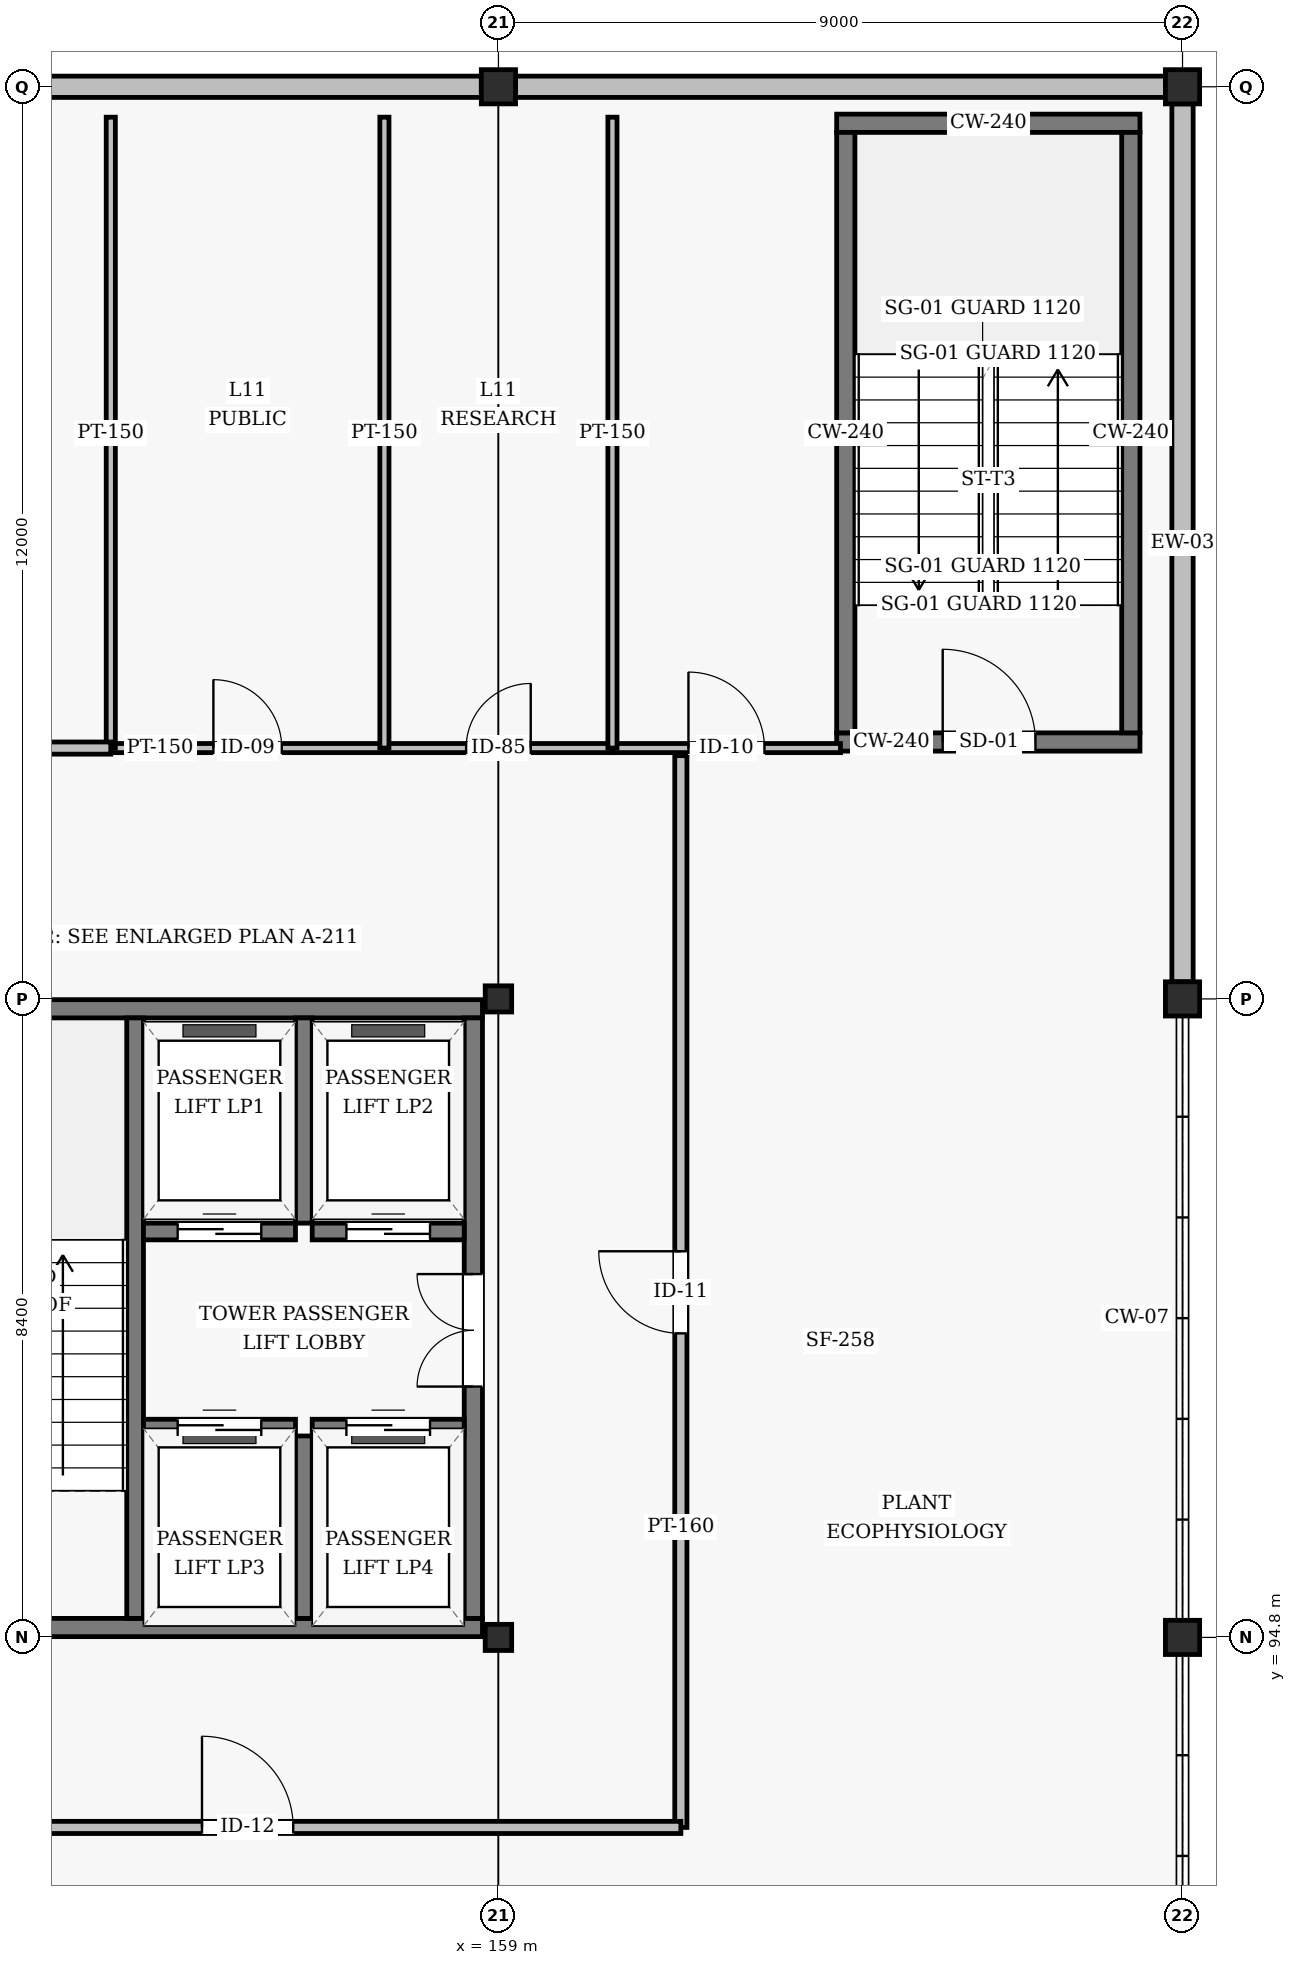
"""IFC4 building model, lengths in metres.
Left out: names, types, materials, properties, quantities, classifications, styles, units other than length and angle.
Written with IfcOpenShell. Run it as: python <this file> out.ifc"""

import sys

from ifc_helpers import new_model, si_unit, direction, frame, frame_2d, origin, origin_2d, place, context, subcontext, project, spatial, rectangle, hollow_rectangle, i_section, extrude, element, fill, save


model = new_model("IFC4")
c1 = context("Model", 3, precision=1e-05, world=origin(), true_north=direction((0.0, 1.0)))
c2 = subcontext(c1, "Body", "Model", "MODEL_VIEW")
j1 = project(units=[si_unit("LENGTHUNIT", "METRE"), si_unit("PLANEANGLEUNIT", "RADIAN")], contexts=[c1])
p1 = place(None, origin())
s1 = spatial("IfcSite", under=j1, at=p1, CompositionType="ELEMENT")
p2 = place(p1, origin())
s2 = spatial("IfcBuilding", under=s1, at=p2, CompositionType="ELEMENT")
p3 = place(p2, frame((0.0, 0.0, 43.2)))
s3 = spatial("IfcBuildingStorey", under=s2, at=p3, CompositionType="ELEMENT", Elevation=43.2)
for number, where, z_axis, x_axis in (
    (1, (159.0, 94.8, 0.0), (0.0, 0.0, 1.0), (1.0, 0.0, 0.0)),
    (2, (159.0, 103.2, 0.0), (0.0, 0.0, 1.0), (1.0, 0.0, 0.0)),
):
    element("IfcColumn", number, at=place(p3, frame(where, z_axis=z_axis, x_axis=x_axis)), inside=s3, PredefinedType="COLUMN", context=c2, shape_type="SweptSolid", body=[
        extrude(i_section(OverallWidth=0.348, OverallDepth=0.344, WebThickness=0.01, FlangeThickness=0.016, FilletRadius=0.02, at=origin_2d()), origin(), (0.0, 0.0, 1.0), 3.6),
    ])
for number, where, z_axis, x_axis in (
    (3, (159.0, 115.2, 0.0), (0.0, 0.0, 1.0), (1.0, 0.0, 0.0)),
    (4, (168.0, 94.8, 0.0), (0.0, 0.0, 1.0), (1.0, 0.0, 0.0)),
    (5, (168.0, 103.2, 0.0), (0.0, 0.0, 1.0), (1.0, 0.0, 0.0)),
    (6, (168.0, 115.2, 0.0), (0.0, 0.0, 1.0), (1.0, 0.0, 0.0)),
):
    element("IfcColumn", number, at=place(p3, frame(where, z_axis=z_axis, x_axis=x_axis)), inside=s3, PredefinedType="COLUMN", context=c2, shape_type="SweptSolid", body=[
        extrude(hollow_rectangle(XDim=0.45, YDim=0.45, WallThickness=0.018, InnerFilletRadius=0.018, OuterFilletRadius=0.036, at=origin_2d()), origin(), (0.0, 0.0, 1.0), 3.6),
    ])
p4 = place(p3, frame((168.0, 103.425, 0.0), z_axis=(0.0, 0.0, 1.0), x_axis=(0.0, 1.0, 0.0)))
e7 = element("IfcWall", 7, at=p4, inside=s3, PredefinedType="SOLIDWALL", context=c2, shape_type="SweptSolid", body=[
    extrude(rectangle(XDim=11.55, YDim=0.28, at=frame_2d((5.775, 0.0))), origin(), (0.0, 0.0, 1.0), 2.562),
])
for number, where, z_axis, x_axis in (
    (8, (167.775, 115.2, 0.0), (0.0, 0.0, 1.0), (-1.0, 0.0, 0.0)),
    (9, (158.775, 115.2, 0.0), (0.0, 0.0, 1.0), (-1.0, 0.0, 0.0)),
):
    element("IfcWall", number, at=place(p3, frame(where, z_axis=z_axis, x_axis=x_axis)), inside=s3, PredefinedType="SOLIDWALL", context=c2, shape_type="SweptSolid", body=[
        extrude(rectangle(XDim=8.55, YDim=0.28, at=frame_2d((4.275, 0.0))), origin(), (0.0, 0.0, 1.0), 2.562),
    ])
p5 = place(p3, frame((150.02, 94.93, 0.0), z_axis=(0.0, 0.0, 1.0), x_axis=(1.0, 0.0, 0.0)))
e10 = element("IfcWall", 10, at=p5, inside=s3, PredefinedType="SHEAR", context=c2, shape_type="SweptSolid", body=[
    extrude(rectangle(XDim=8.77, YDim=0.24, at=frame_2d((4.385, 0.0))), origin(), (0.0, 0.0, 1.0), 3.354),
])
p6 = place(p5, frame((1.79, 0.0, 0.0)))
e11 = element("IfcOpeningElement", 11, at=p6, cuts=e10, PredefinedType="OPENING", context=c2, shape_type="SweptSolid", body=[
    extrude(rectangle(XDim=1.22, YDim=2.18, at=frame_2d((0.61, 1.09))), frame((0.0, 0.13, 0.0), z_axis=(0.0, -1.0, 0.0), x_axis=(1.0, 0.0, 0.0)), (0.0, 0.0, 1.0), 0.26),
])
p7 = place(p3, frame((150.02, 103.07, 0.0), z_axis=(0.0, 0.0, 1.0), x_axis=(1.0, 0.0, 0.0)))
e12 = element("IfcWall", 12, at=p7, inside=s3, PredefinedType="SHEAR", context=c2, shape_type="SweptSolid", body=[
    extrude(rectangle(XDim=8.77, YDim=0.24, at=frame_2d((4.385, 0.0))), origin(), (0.0, 0.0, 1.0), 3.354),
])
p8 = place(p3, frame((154.22, 95.05, 0.0), z_axis=(0.0, 0.0, 1.0), x_axis=(0.0, 1.0, 0.0)))
e13 = element("IfcWall", 13, at=p8, inside=s3, PredefinedType="SHEAR", context=c2, shape_type="SweptSolid", body=[
    extrude(rectangle(XDim=7.9, YDim=0.22, at=frame_2d((3.95, 0.0))), origin(), (0.0, 0.0, 1.0), 3.354),
])
p9 = place(p3, frame((158.67, 95.05, 0.0), z_axis=(0.0, 0.0, 1.0), x_axis=(0.0, 1.0, 0.0)))
e14 = element("IfcWall", 14, at=p9, inside=s3, PredefinedType="SHEAR", context=c2, shape_type="SweptSolid", body=[
    extrude(rectangle(XDim=7.9, YDim=0.24, at=frame_2d((3.95, 0.0))), origin(), (0.0, 0.0, 1.0), 3.354),
])
p10 = place(p9, frame((3.05, 0.0, 0.0)))
e15 = element("IfcOpeningElement", 15, at=p10, cuts=e14, PredefinedType="OPENING", context=c2, shape_type="SweptSolid", body=[
    extrude(rectangle(XDim=1.48, YDim=2.22, at=frame_2d((0.74, 1.11))), frame((0.0, 0.13, 0.0), z_axis=(0.0, -1.0, 0.0), x_axis=(1.0, 0.0, 0.0)), (0.0, 0.0, 1.0), 0.26),
])
p11 = place(p3, frame((156.44, 100.25, 0.0), z_axis=(0.0, 0.0, 1.0), x_axis=(0.0, 1.0, 0.0)))
e16 = element("IfcWall", 16, at=p11, inside=s3, PredefinedType="SHEAR", context=c2, shape_type="SweptSolid", body=[
    extrude(rectangle(XDim=2.7, YDim=0.22, at=frame_2d((1.35, 0.0))), origin(), (0.0, 0.0, 1.0), 3.354),
])
p12 = place(p3, frame((154.33, 100.14, 0.0), z_axis=(0.0, 0.0, 1.0), x_axis=(1.0, 0.0, 0.0)))
e17 = element("IfcWall", 17, at=p12, inside=s3, PredefinedType="SHEAR", context=c2, shape_type="SweptSolid", body=[
    extrude(rectangle(XDim=2.0, YDim=0.22, at=frame_2d((1.0, 0.0))), origin(), (0.0, 0.0, 1.0), 3.354),
])
p13 = place(p12, frame((0.45, 0.0, 0.0)))
e18 = element("IfcOpeningElement", 18, at=p13, cuts=e17, PredefinedType="OPENING", context=c2, shape_type="SweptSolid", body=[
    extrude(rectangle(XDim=1.1, YDim=2.15, at=frame_2d((0.55, 1.075))), frame((0.0, 0.12, 0.0), z_axis=(0.0, -1.0, 0.0), x_axis=(1.0, 0.0, 0.0)), (0.0, 0.0, 1.0), 0.24),
])
p14 = place(p3, frame((156.55, 100.14, 0.0), z_axis=(0.0, 0.0, 1.0), x_axis=(1.0, 0.0, 0.0)))
e19 = element("IfcWall", 19, at=p14, inside=s3, PredefinedType="SHEAR", context=c2, shape_type="SweptSolid", body=[
    extrude(rectangle(XDim=2.0, YDim=0.22, at=frame_2d((1.0, 0.0))), origin(), (0.0, 0.0, 1.0), 3.354),
])
p15 = place(p14, frame((0.45, 0.0, 0.0)))
e20 = element("IfcOpeningElement", 20, at=p15, cuts=e19, PredefinedType="OPENING", context=c2, shape_type="SweptSolid", body=[
    extrude(rectangle(XDim=1.1, YDim=2.15, at=frame_2d((0.55, 1.075))), frame((0.0, 0.12, 0.0), z_axis=(0.0, -1.0, 0.0), x_axis=(1.0, 0.0, 0.0)), (0.0, 0.0, 1.0), 0.24),
])
p16 = place(p3, frame((156.44, 95.05, 0.0), z_axis=(0.0, 0.0, 1.0), x_axis=(0.0, 1.0, 0.0)))
e21 = element("IfcWall", 21, at=p16, inside=s3, PredefinedType="SHEAR", context=c2, shape_type="SweptSolid", body=[
    extrude(rectangle(XDim=2.4, YDim=0.22, at=frame_2d((1.2, 0.0))), origin(), (0.0, 0.0, 1.0), 3.354),
])
p17 = place(p3, frame((154.33, 97.56, 0.0), z_axis=(0.0, 0.0, 1.0), x_axis=(1.0, 0.0, 0.0)))
e22 = element("IfcWall", 22, at=p17, inside=s3, PredefinedType="SHEAR", context=c2, shape_type="SweptSolid", body=[
    extrude(rectangle(XDim=2.0, YDim=0.22, at=frame_2d((1.0, 0.0))), origin(), (0.0, 0.0, 1.0), 3.354),
])
p18 = place(p17, frame((0.45, 0.0, 0.0)))
e23 = element("IfcOpeningElement", 23, at=p18, cuts=e22, PredefinedType="OPENING", context=c2, shape_type="SweptSolid", body=[
    extrude(rectangle(XDim=1.1, YDim=2.15, at=frame_2d((0.55, 1.075))), frame((0.0, 0.12, 0.0), z_axis=(0.0, -1.0, 0.0), x_axis=(1.0, 0.0, 0.0)), (0.0, 0.0, 1.0), 0.24),
])
p19 = place(p3, frame((156.55, 97.56, 0.0), z_axis=(0.0, 0.0, 1.0), x_axis=(1.0, 0.0, 0.0)))
e24 = element("IfcWall", 24, at=p19, inside=s3, PredefinedType="SHEAR", context=c2, shape_type="SweptSolid", body=[
    extrude(rectangle(XDim=2.0, YDim=0.22, at=frame_2d((1.0, 0.0))), origin(), (0.0, 0.0, 1.0), 3.354),
])
p20 = place(p19, frame((0.45, 0.0, 0.0)))
e25 = element("IfcOpeningElement", 25, at=p20, cuts=e24, PredefinedType="OPENING", context=c2, shape_type="SweptSolid", body=[
    extrude(rectangle(XDim=1.1, YDim=2.15, at=frame_2d((0.55, 1.075))), frame((0.0, 0.12, 0.0), z_axis=(0.0, -1.0, 0.0), x_axis=(1.0, 0.0, 0.0)), (0.0, 0.0, 1.0), 0.24),
])
p21 = place(p3, frame((163.45, 106.58, 0.0), z_axis=(0.0, 0.0, 1.0), x_axis=(1.0, 0.0, 0.0)))
e26 = element("IfcWall", 26, at=p21, inside=s3, PredefinedType="SHEAR", context=c2, shape_type="SweptSolid", body=[
    extrude(rectangle(XDim=3.99, YDim=0.24, at=frame_2d((1.995, 0.0))), origin(), (0.0, 0.0, 1.0), 3.354),
])
p22 = place(p21, frame((1.395, 0.0, 0.0)))
e27 = element("IfcOpeningElement", 27, at=p22, cuts=e26, PredefinedType="OPENING", context=c2, shape_type="SweptSolid", body=[
    extrude(rectangle(XDim=1.22, YDim=2.18, at=frame_2d((0.61, 1.09))), frame((0.0, 0.13, 0.0), z_axis=(0.0, -1.0, 0.0), x_axis=(1.0, 0.0, 0.0)), (0.0, 0.0, 1.0), 0.26),
])
p23 = place(p3, frame((163.45, 114.72, 0.0), z_axis=(0.0, 0.0, 1.0), x_axis=(1.0, 0.0, 0.0)))
e28 = element("IfcWall", 28, at=p23, inside=s3, PredefinedType="SHEAR", context=c2, shape_type="SweptSolid", body=[
    extrude(rectangle(XDim=3.99, YDim=0.24, at=frame_2d((1.995, 0.0))), origin(), (0.0, 0.0, 1.0), 3.354),
])
for number, where, z_axis, x_axis in (
    (29, (163.57, 106.7, 0.0), (0.0, 0.0, 1.0), (0.0, 1.0, 0.0)),
    (30, (167.32, 106.7, 0.0), (0.0, 0.0, 1.0), (0.0, 1.0, 0.0)),
):
    element("IfcWall", number, at=place(p3, frame(where, z_axis=z_axis, x_axis=x_axis)), inside=s3, PredefinedType="SHEAR", context=c2, shape_type="SweptSolid", body=[
        extrude(rectangle(XDim=7.9, YDim=0.24, at=frame_2d((3.95, 0.0))), origin(), (0.0, 0.0, 1.0), 3.354),
    ])
p24 = place(p3, frame((153.9, 106.5, 0.0), z_axis=(0.0, 0.0, 1.0), x_axis=(1.0, 0.0, 0.0)))
e31 = element("IfcWall", 31, at=p24, inside=s3, PredefinedType="PARTITIONING", context=c2, shape_type="SweptSolid", body=[
    extrude(rectangle(XDim=3.6, YDim=0.12, at=frame_2d((1.8, 0.0))), origin(), (0.0, 0.0, 1.0), 3.354),
])
p25 = place(p24, frame((1.35, 0.0, 0.0)))
e32 = element("IfcOpeningElement", 32, at=p25, cuts=e31, PredefinedType="OPENING", context=c2, shape_type="SweptSolid", body=[
    extrude(rectangle(XDim=0.9, YDim=2.1, at=frame_2d((0.45, 1.05))), frame((0.0, 0.07, 0.0), z_axis=(0.0, -1.0, 0.0), x_axis=(1.0, 0.0, 0.0)), (0.0, 0.0, 1.0), 0.14),
])
p26 = place(p3, frame((157.5, 106.5, 0.0), z_axis=(0.0, 0.0, 1.0), x_axis=(1.0, 0.0, 0.0)))
e33 = element("IfcWall", 33, at=p26, inside=s3, PredefinedType="PARTITIONING", context=c2, shape_type="SweptSolid", body=[
    extrude(rectangle(XDim=3.0, YDim=0.12, at=frame_2d((1.5, 0.0))), origin(), (0.0, 0.0, 1.0), 2.654),
])
p27 = place(p26, frame((1.075, 0.0, 0.0)))
e34 = element("IfcOpeningElement", 34, at=p27, cuts=e33, PredefinedType="OPENING", context=c2, shape_type="SweptSolid", body=[
    extrude(rectangle(XDim=0.85, YDim=2.1, at=frame_2d((0.425, 1.05))), frame((0.0, 0.07, 0.0), z_axis=(0.0, -1.0, 0.0), x_axis=(1.0, 0.0, 0.0)), (0.0, 0.0, 1.0), 0.14),
])
p28 = place(p3, frame((160.5, 106.5, 0.0), z_axis=(0.0, 0.0, 1.0), x_axis=(1.0, 0.0, 0.0)))
e35 = element("IfcWall", 35, at=p28, inside=s3, PredefinedType="PARTITIONING", context=c2, shape_type="SweptSolid", body=[
    extrude(rectangle(XDim=3.0, YDim=0.12, at=frame_2d((1.5, 0.0))), origin(), (0.0, 0.0, 1.0), 3.354),
])
p29 = place(p28, frame((1.0, 0.0, 0.0)))
e36 = element("IfcOpeningElement", 36, at=p29, cuts=e35, PredefinedType="OPENING", context=c2, shape_type="SweptSolid", body=[
    extrude(rectangle(XDim=1.0, YDim=2.1, at=frame_2d((0.5, 1.05))), frame((0.0, 0.07, 0.0), z_axis=(0.0, -1.0, 0.0), x_axis=(1.0, 0.0, 0.0)), (0.0, 0.0, 1.0), 0.14),
])
for number, where, z_axis, x_axis in (
    (37, (153.9, 106.5, 0.0), (0.0, 0.0, 1.0), (0.0, 1.0, 0.0)),
    (38, (157.5, 106.5, 0.0), (0.0, 0.0, 1.0), (0.0, 1.0, 0.0)),
):
    element("IfcWall", number, at=place(p3, frame(where, z_axis=z_axis, x_axis=x_axis)), inside=s3, PredefinedType="PARTITIONING", context=c2, shape_type="SweptSolid", body=[
        extrude(rectangle(XDim=8.3, YDim=0.12, at=frame_2d((4.15, 0.0))), origin(), (0.0, 0.0, 1.0), 2.958),
    ])
p30 = place(p3, frame((160.5, 106.5, 0.0), z_axis=(0.0, 0.0, 1.0), x_axis=(0.0, 1.0, 0.0)))
e39 = element("IfcWall", 39, at=p30, inside=s3, PredefinedType="PARTITIONING", context=c2, shape_type="SweptSolid", body=[
    extrude(rectangle(XDim=8.3, YDim=0.12, at=frame_2d((4.15, 0.0))), origin(), (0.0, 0.0, 1.0), 3.354),
])
p31 = place(p3, frame((161.4, 92.3, 0.0), z_axis=(0.0, 0.0, 1.0), x_axis=(0.0, 1.0, 0.0)))
e40 = element("IfcWall", 40, at=p31, inside=s3, PredefinedType="PARTITIONING", context=c2, shape_type="SweptSolid", body=[
    extrude(rectangle(XDim=14.1, YDim=0.16, at=frame_2d((7.05, 0.0))), origin(), (0.0, 0.0, 1.0), 2.758),
])
p32 = place(p31, frame((6.5, 0.0, 0.0)))
e41 = element("IfcOpeningElement", 41, at=p32, cuts=e40, PredefinedType="OPENING", context=c2, shape_type="SweptSolid", body=[
    extrude(rectangle(XDim=1.08, YDim=2.08, at=frame_2d((0.54, 1.04))), frame((0.0, 0.09, 0.0), z_axis=(0.0, -1.0, 0.0), x_axis=(1.0, 0.0, 0.0)), (0.0, 0.0, 1.0), 0.18),
])
p33 = place(p3, frame((150.0, 92.3, 0.0), z_axis=(0.0, 0.0, 1.0), x_axis=(1.0, 0.0, 0.0)))
e42 = element("IfcWall", 42, at=p33, inside=s3, PredefinedType="PARTITIONING", context=c2, shape_type="SweptSolid", body=[
    extrude(rectangle(XDim=11.4, YDim=0.16, at=frame_2d((5.7, 0.0))), origin(), (0.0, 0.0, 1.0), 2.854),
])
p34 = place(p33, frame((5.1, 0.0, 0.0)))
e43 = element("IfcOpeningElement", 43, at=p34, cuts=e42, PredefinedType="OPENING", context=c2, shape_type="SweptSolid", body=[
    extrude(rectangle(XDim=1.2, YDim=2.08, at=frame_2d((0.6, 1.04))), frame((0.0, 0.09, 0.0), z_axis=(0.0, -1.0, 0.0), x_axis=(1.0, 0.0, 0.0)), (0.0, 0.0, 1.0), 0.18),
])
p35 = place(p3, frame((146.5, 106.5, 0.0), z_axis=(0.0, 0.0, 1.0), x_axis=(1.0, 0.0, 0.0)))
e44 = element("IfcWall", 44, at=p35, inside=s3, PredefinedType="PARTITIONING", context=c2, shape_type="SweptSolid", body=[
    extrude(rectangle(XDim=7.4, YDim=0.16, at=frame_2d((3.7, 0.0))), origin(), (0.0, 0.0, 1.0), 2.654),
])
p36 = place(p35, frame((3.15, 0.0, 0.0)))
e45 = element("IfcOpeningElement", 45, at=p36, cuts=e44, PredefinedType="OPENING", context=c2, shape_type="SweptSolid", body=[
    extrude(rectangle(XDim=1.08, YDim=2.08, at=frame_2d((0.54, 1.04))), frame((0.0, 0.09, 0.0), z_axis=(0.0, -1.0, 0.0), x_axis=(1.0, 0.0, 0.0)), (0.0, 0.0, 1.0), 0.18),
])
p37 = place(p10, origin())
e46 = element("IfcDoor", 46, at=p37, inside=s3, OperationType="DOUBLE_DOOR_SINGLE_SWING", PredefinedType="DOOR", context=c2, shape_type="SweptSolid", body=[
    extrude(rectangle(XDim=1.48, YDim=2.22, at=frame_2d((0.74, 1.11))), frame((0.0, 0.025, 0.0), z_axis=(0.0, -1.0, 0.0), x_axis=(1.0, 0.0, 0.0)), (0.0, 0.0, 1.0), 0.05),
])
fill(e15, e46)
p38 = place(p13, origin())
e47 = element("IfcDoor", 47, at=p38, inside=s3, OperationType="SLIDING_TO_LEFT", PredefinedType="DOOR", context=c2, shape_type="SweptSolid", body=[
    extrude(rectangle(XDim=1.1, YDim=2.15, at=frame_2d((0.55, 1.075))), frame((0.0, 0.025, 0.0), z_axis=(0.0, -1.0, 0.0), x_axis=(1.0, 0.0, 0.0)), (0.0, 0.0, 1.0), 0.05),
])
fill(e18, e47)
p39 = place(p15, origin())
e48 = element("IfcDoor", 48, at=p39, inside=s3, OperationType="SLIDING_TO_LEFT", PredefinedType="DOOR", context=c2, shape_type="SweptSolid", body=[
    extrude(rectangle(XDim=1.1, YDim=2.15, at=frame_2d((0.55, 1.075))), frame((0.0, 0.025, 0.0), z_axis=(0.0, -1.0, 0.0), x_axis=(1.0, 0.0, 0.0)), (0.0, 0.0, 1.0), 0.05),
])
fill(e20, e48)
p40 = place(p18, origin())
e49 = element("IfcDoor", 49, at=p40, inside=s3, OperationType="SLIDING_TO_LEFT", PredefinedType="DOOR", context=c2, shape_type="SweptSolid", body=[
    extrude(rectangle(XDim=1.1, YDim=2.15, at=frame_2d((0.55, 1.075))), frame((0.0, 0.025, 0.0), z_axis=(0.0, -1.0, 0.0), x_axis=(1.0, 0.0, 0.0)), (0.0, 0.0, 1.0), 0.05),
])
fill(e23, e49)
p41 = place(p20, origin())
e50 = element("IfcDoor", 50, at=p41, inside=s3, OperationType="SLIDING_TO_LEFT", PredefinedType="DOOR", context=c2, shape_type="SweptSolid", body=[
    extrude(rectangle(XDim=1.1, YDim=2.15, at=frame_2d((0.55, 1.075))), frame((0.0, 0.025, 0.0), z_axis=(0.0, -1.0, 0.0), x_axis=(1.0, 0.0, 0.0)), (0.0, 0.0, 1.0), 0.05),
])
fill(e25, e50)
p42 = place(p22, origin())
e51 = element("IfcDoor", 51, at=p42, inside=s3, OperationType="SINGLE_SWING_LEFT", PredefinedType="DOOR", context=c2, shape_type="SweptSolid", body=[
    extrude(rectangle(XDim=1.22, YDim=2.18, at=frame_2d((0.61, 1.09))), frame((0.0, 0.025, 0.0), z_axis=(0.0, -1.0, 0.0), x_axis=(1.0, 0.0, 0.0)), (0.0, 0.0, 1.0), 0.05),
])
fill(e27, e51)
p43 = place(p25, origin())
e52 = element("IfcDoor", 52, at=p43, inside=s3, OperationType="SINGLE_SWING_LEFT", PredefinedType="DOOR", context=c2, shape_type="SweptSolid", body=[
    extrude(rectangle(XDim=0.9, YDim=2.1, at=frame_2d((0.45, 1.05))), frame((0.0, 0.025, 0.0), z_axis=(0.0, -1.0, 0.0), x_axis=(1.0, 0.0, 0.0)), (0.0, 0.0, 1.0), 0.05),
])
fill(e32, e52)
p44 = place(p27, origin())
e53 = element("IfcDoor", 53, at=p44, inside=s3, OperationType="SINGLE_SWING_RIGHT", PredefinedType="DOOR", context=c2, shape_type="SweptSolid", body=[
    extrude(rectangle(XDim=0.85, YDim=2.1, at=frame_2d((0.425, 1.05))), frame((0.0, 0.025, 0.0), z_axis=(0.0, -1.0, 0.0), x_axis=(1.0, 0.0, 0.0)), (0.0, 0.0, 1.0), 0.05),
])
fill(e34, e53)
p45 = place(p29, origin())
e54 = element("IfcDoor", 54, at=p45, inside=s3, OperationType="SINGLE_SWING_LEFT", PredefinedType="DOOR", context=c2, shape_type="SweptSolid", body=[
    extrude(rectangle(XDim=1.0, YDim=2.1, at=frame_2d((0.5, 1.05))), frame((0.0, 0.025, 0.0), z_axis=(0.0, -1.0, 0.0), x_axis=(1.0, 0.0, 0.0)), (0.0, 0.0, 1.0), 0.05),
])
fill(e36, e54)
p46 = place(p32, origin())
e55 = element("IfcDoor", 55, at=p46, inside=s3, OperationType="SINGLE_SWING_RIGHT", PredefinedType="DOOR", context=c2, shape_type="SweptSolid", body=[
    extrude(rectangle(XDim=1.08, YDim=2.08, at=frame_2d((0.54, 1.04))), frame((0.0, 0.025, 0.0), z_axis=(0.0, -1.0, 0.0), x_axis=(1.0, 0.0, 0.0)), (0.0, 0.0, 1.0), 0.05),
])
fill(e41, e55)
p47 = place(p34, origin())
e56 = element("IfcDoor", 56, at=p47, inside=s3, OperationType="SINGLE_SWING_LEFT", PredefinedType="DOOR", context=c2, shape_type="SweptSolid", body=[
    extrude(rectangle(XDim=1.2, YDim=2.08, at=frame_2d((0.6, 1.04))), frame((0.0, 0.025, 0.0), z_axis=(0.0, -1.0, 0.0), x_axis=(1.0, 0.0, 0.0)), (0.0, 0.0, 1.0), 0.05),
])
fill(e43, e56)
save(model, sys.argv[1])
